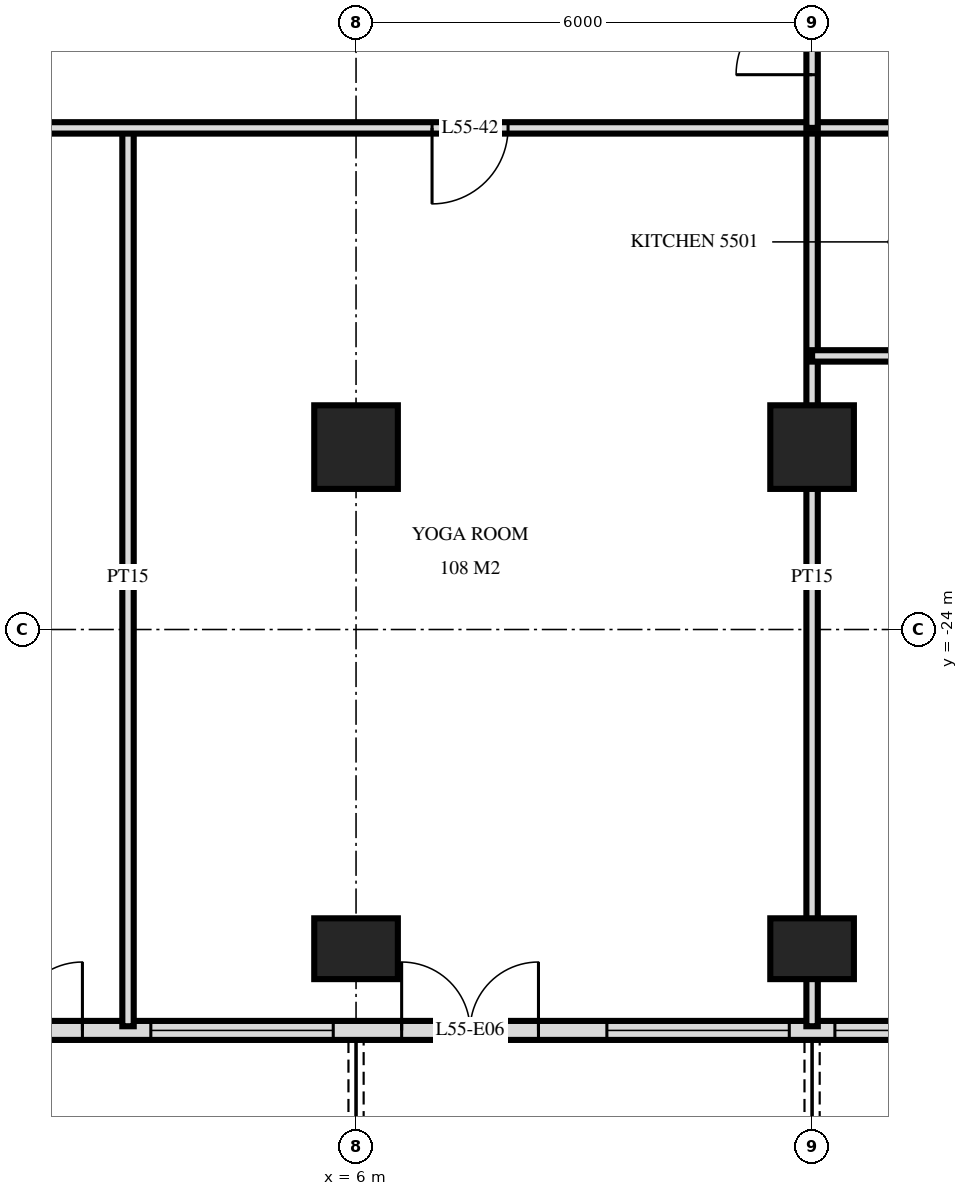
"""IFC4 building model, lengths in metres.
Left out: names, types, materials, properties, quantities, classifications, styles, units other than length and angle.
Written with IfcOpenShell. Run it as: python <this file> out.ifc"""

import sys

from ifc_helpers import new_model, si_unit, direction, frame, frame_2d, origin, origin_2d, place, context, subcontext, project, spatial, rectangle, extrude, element, fill, save


model = new_model("IFC4")
c1 = context("Model", 3, precision=1e-05, world=origin(), true_north=direction((0.0, 1.0)))
c2 = subcontext(c1, "Body", "Model", "MODEL_VIEW")
j1 = project(units=[si_unit("LENGTHUNIT", "METRE"), si_unit("PLANEANGLEUNIT", "RADIAN")], contexts=[c1])
p1 = place(None, origin())
s1 = spatial("IfcSite", under=j1, at=p1, CompositionType="ELEMENT")
p2 = place(p1, origin())
s2 = spatial("IfcBuilding", under=s1, at=p2, CompositionType="ELEMENT")
p3 = place(p2, frame((0.0, 0.0, 211.6)))
s3 = spatial("IfcBuildingStorey", under=s2, at=p3, CompositionType="ELEMENT", Elevation=211.6)
p4 = place(p3, frame((6.0, -28.2, 0.0), z_axis=(0.0, 0.0, 1.0), x_axis=(1.0, 0.0, 0.0)))
e1 = element("IfcColumn", 1, at=p4, inside=s3, PredefinedType="COLUMN", context=c2, shape_type="SweptSolid", body=[
    extrude(rectangle(XDim=1.1, YDim=0.8, at=origin_2d()), origin(), (0.0, 0.0, 1.0), 3.5),
])
p5 = place(p3, frame((6.0, -21.6, 0.0), z_axis=(0.0, 0.0, 1.0), x_axis=(1.0, 0.0, 0.0)))
e2 = element("IfcColumn", 2, at=p5, inside=s3, PredefinedType="COLUMN", context=c2, shape_type="SweptSolid", body=[
    extrude(rectangle(XDim=1.1, YDim=1.1, at=origin_2d()), origin(), (0.0, 0.0, 1.0), 3.5),
])
p6 = place(p3, frame((12.0, -28.2, 0.0), z_axis=(0.0, 0.0, 1.0), x_axis=(1.0, 0.0, 0.0)))
e3 = element("IfcColumn", 3, at=p6, inside=s3, PredefinedType="COLUMN", context=c2, shape_type="SweptSolid", body=[
    extrude(rectangle(XDim=1.1, YDim=0.8, at=origin_2d()), origin(), (0.0, 0.0, 1.0), 3.5),
])
p7 = place(p3, frame((12.0, -21.6, 0.0), z_axis=(0.0, 0.0, 1.0), x_axis=(1.0, 0.0, 0.0)))
e4 = element("IfcColumn", 4, at=p7, inside=s3, PredefinedType="COLUMN", context=c2, shape_type="SweptSolid", body=[
    extrude(rectangle(XDim=1.1, YDim=1.1, at=origin_2d()), origin(), (0.0, 0.0, 1.0), 3.5),
])
p8 = place(p3, frame((-22.475, -29.275, 0.0), z_axis=(0.0, 0.0, 1.0), x_axis=(1.0, 0.0, 0.0)))
e5 = element("IfcWall", 5, at=p8, inside=s3, PredefinedType="SOLIDWALL", context=c2, shape_type="SweptSolid", body=[
    extrude(rectangle(XDim=44.951, YDim=0.25, at=frame_2d((22.475, 0.0))), origin(), (0.0, 0.0, 1.0), 3.22),
])
p9 = place(p8, frame((0.575, 0.0, 0.0)))
e6 = element("IfcOpeningElement", 6, at=p9, cuts=e5, PredefinedType="OPENING", context=c2, shape_type="SweptSolid", body=[
    extrude(rectangle(XDim=1.8, YDim=2.4, at=frame_2d((0.9, 1.2))), frame((0.0, 0.135, 0.0), z_axis=(0.0, -1.0, 0.0), x_axis=(1.0, 0.0, 0.0)), (0.0, 0.0, 1.0), 0.27),
])
p10 = place(p8, frame((6.2, 0.0, 0.0)))
e7 = element("IfcOpeningElement", 7, at=p10, cuts=e5, PredefinedType="OPENING", context=c2, shape_type="SweptSolid", body=[
    extrude(rectangle(XDim=1.8, YDim=2.4, at=frame_2d((0.9, 1.2))), frame((0.0, 0.135, 0.0), z_axis=(0.0, -1.0, 0.0), x_axis=(1.0, 0.0, 0.0)), (0.0, 0.0, 1.0), 0.27),
])
p11 = place(p8, frame((8.45, 0.0, 0.9)))
e8 = element("IfcOpeningElement", 8, at=p11, cuts=e5, PredefinedType="OPENING", context=c2, shape_type="SweptSolid", body=[
    extrude(rectangle(XDim=1.8, YDim=1.5, at=frame_2d((0.9, 0.75))), frame((0.0, 0.135, 0.0), z_axis=(0.0, -1.0, 0.0), x_axis=(1.0, 0.0, 0.0)), (0.0, 0.0, 1.0), 0.27),
])
p12 = place(p8, frame((11.075, 0.0, 0.0)))
e9 = element("IfcOpeningElement", 9, at=p12, cuts=e5, PredefinedType="OPENING", context=c2, shape_type="SweptSolid", body=[
    extrude(rectangle(XDim=1.8, YDim=2.4, at=frame_2d((0.9, 1.2))), frame((0.0, 0.135, 0.0), z_axis=(0.0, -1.0, 0.0), x_axis=(1.0, 0.0, 0.0)), (0.0, 0.0, 1.0), 0.27),
])
p13 = place(p8, frame((13.775, 0.0, 0.9)))
e10 = element("IfcOpeningElement", 10, at=p13, cuts=e5, PredefinedType="OPENING", context=c2, shape_type="SweptSolid", body=[
    extrude(rectangle(XDim=2.4, YDim=1.5, at=frame_2d((1.2, 0.75))), frame((0.0, 0.135, 0.0), z_axis=(0.0, -1.0, 0.0), x_axis=(1.0, 0.0, 0.0)), (0.0, 0.0, 1.0), 0.27),
])
p14 = place(p8, frame((16.775, 0.0, 0.9)))
e11 = element("IfcOpeningElement", 11, at=p14, cuts=e5, PredefinedType="OPENING", context=c2, shape_type="SweptSolid", body=[
    extrude(rectangle(XDim=2.4, YDim=1.5, at=frame_2d((1.2, 0.75))), frame((0.0, 0.135, 0.0), z_axis=(0.0, -1.0, 0.0), x_axis=(1.0, 0.0, 0.0)), (0.0, 0.0, 1.0), 0.27),
])
p15 = place(p8, frame((20.075, 0.0, 0.0)))
e12 = element("IfcOpeningElement", 12, at=p15, cuts=e5, PredefinedType="OPENING", context=c2, shape_type="SweptSolid", body=[
    extrude(rectangle(XDim=1.8, YDim=2.4, at=frame_2d((0.9, 1.2))), frame((0.0, 0.135, 0.0), z_axis=(0.0, -1.0, 0.0), x_axis=(1.0, 0.0, 0.0)), (0.0, 0.0, 1.0), 0.27),
])
p16 = place(p8, frame((23.075, 0.0, 0.0)))
e13 = element("IfcOpeningElement", 13, at=p16, cuts=e5, PredefinedType="OPENING", context=c2, shape_type="SweptSolid", body=[
    extrude(rectangle(XDim=1.8, YDim=2.4, at=frame_2d((0.9, 1.2))), frame((0.0, 0.135, 0.0), z_axis=(0.0, -1.0, 0.0), x_axis=(1.0, 0.0, 0.0)), (0.0, 0.0, 1.0), 0.27),
])
p17 = place(p8, frame((25.775, 0.0, 0.9)))
e14 = element("IfcOpeningElement", 14, at=p17, cuts=e5, PredefinedType="OPENING", context=c2, shape_type="SweptSolid", body=[
    extrude(rectangle(XDim=2.4, YDim=1.5, at=frame_2d((1.2, 0.75))), frame((0.0, 0.135, 0.0), z_axis=(0.0, -1.0, 0.0), x_axis=(1.0, 0.0, 0.0)), (0.0, 0.0, 1.0), 0.27),
])
p18 = place(p8, frame((29.075, 0.0, 0.0)))
e15 = element("IfcOpeningElement", 15, at=p18, cuts=e5, PredefinedType="OPENING", context=c2, shape_type="SweptSolid", body=[
    extrude(rectangle(XDim=1.8, YDim=2.4, at=frame_2d((0.9, 1.2))), frame((0.0, 0.135, 0.0), z_axis=(0.0, -1.0, 0.0), x_axis=(1.0, 0.0, 0.0)), (0.0, 0.0, 1.0), 0.27),
])
p19 = place(p8, frame((31.775, 0.0, 0.9)))
e16 = element("IfcOpeningElement", 16, at=p19, cuts=e5, PredefinedType="OPENING", context=c2, shape_type="SweptSolid", body=[
    extrude(rectangle(XDim=2.4, YDim=1.5, at=frame_2d((1.2, 0.75))), frame((0.0, 0.135, 0.0), z_axis=(0.0, -1.0, 0.0), x_axis=(1.0, 0.0, 0.0)), (0.0, 0.0, 1.0), 0.27),
])
p20 = place(p8, frame((34.775, 0.0, 0.9)))
e17 = element("IfcOpeningElement", 17, at=p20, cuts=e5, PredefinedType="OPENING", context=c2, shape_type="SweptSolid", body=[
    extrude(rectangle(XDim=2.4, YDim=1.5, at=frame_2d((1.2, 0.75))), frame((0.0, 0.135, 0.0), z_axis=(0.0, -1.0, 0.0), x_axis=(1.0, 0.0, 0.0)), (0.0, 0.0, 1.0), 0.27),
])
p21 = place(p8, frame((38.075, 0.0, 0.0)))
e18 = element("IfcOpeningElement", 18, at=p21, cuts=e5, PredefinedType="OPENING", context=c2, shape_type="SweptSolid", body=[
    extrude(rectangle(XDim=1.8, YDim=2.4, at=frame_2d((0.9, 1.2))), frame((0.0, 0.135, 0.0), z_axis=(0.0, -1.0, 0.0), x_axis=(1.0, 0.0, 0.0)), (0.0, 0.0, 1.0), 0.27),
])
p22 = place(p8, frame((41.075, 0.0, 0.0)))
e19 = element("IfcOpeningElement", 19, at=p22, cuts=e5, PredefinedType="OPENING", context=c2, shape_type="SweptSolid", body=[
    extrude(rectangle(XDim=1.8, YDim=2.4, at=frame_2d((0.9, 1.2))), frame((0.0, 0.135, 0.0), z_axis=(0.0, -1.0, 0.0), x_axis=(1.0, 0.0, 0.0)), (0.0, 0.0, 1.0), 0.27),
])
p23 = place(p3, frame((12.0, -17.4, 0.0), z_axis=(0.0, 0.0, 1.0), x_axis=(0.0, 1.0, 0.0)))
e20 = element("IfcWall", 20, at=p23, inside=s3, PredefinedType="PARTITIONING", context=c2, shape_type="SweptSolid", body=[
    extrude(rectangle(XDim=2.35, YDim=0.15, at=frame_2d((1.175, 0.0))), origin(), (0.0, 0.0, 1.0), 3.22),
])
p24 = place(p23, frame((0.7, 0.0, 0.0)))
e21 = element("IfcOpeningElement", 21, at=p24, cuts=e20, PredefinedType="OPENING", context=c2, shape_type="SweptSolid", body=[
    extrude(rectangle(XDim=1.0, YDim=2.1, at=frame_2d((0.5, 1.05))), frame((0.0, 0.085, 0.0), z_axis=(0.0, -1.0, 0.0), x_axis=(1.0, 0.0, 0.0)), (0.0, 0.0, 1.0), 0.17),
])
for number, where, z_axis, x_axis in (
    (22, (12.0, -29.22, 0.0), (0.0, 0.0, 1.0), (0.0, 1.0, 0.0)),
    (23, (3.0, -29.22, 0.0), (0.0, 0.0, 1.0), (0.0, 1.0, 0.0)),
):
    element("IfcWall", number, at=place(p3, frame(where, z_axis=z_axis, x_axis=x_axis)), inside=s3, PredefinedType="PARTITIONING", context=c2, shape_type="SweptSolid", body=[
        extrude(rectangle(XDim=11.82, YDim=0.15, at=frame_2d((5.91, 0.0))), origin(), (0.0, 0.0, 1.0), 3.22),
    ])
p25 = place(p3, frame((12.0, -20.4, 0.0), z_axis=(0.0, 0.0, 1.0), x_axis=(1.0, 0.0, 0.0)))
e24 = element("IfcWall", 24, at=p25, inside=s3, PredefinedType="PARTITIONING", context=c2, shape_type="SweptSolid", body=[
    extrude(rectangle(XDim=2.1, YDim=0.15, at=frame_2d((1.05, 0.0))), origin(), (0.0, 0.0, 1.0), 3.22),
])
p26 = place(p3, frame((-26.82, -17.4, 0.0), z_axis=(0.0, 0.0, 1.0), x_axis=(1.0, 0.0, 0.0)))
e25 = element("IfcWall", 25, at=p26, inside=s3, PredefinedType="PARTITIONING", context=c2, shape_type="SweptSolid", body=[
    extrude(rectangle(XDim=53.64, YDim=0.15, at=frame_2d((26.82, 0.0))), origin(), (0.0, 0.0, 1.0), 3.22),
])
p27 = place(p26, frame((4.92, 0.0, 0.0)))
e26 = element("IfcOpeningElement", 26, at=p27, cuts=e25, PredefinedType="OPENING", context=c2, shape_type="SweptSolid", body=[
    extrude(rectangle(XDim=1.0, YDim=2.1, at=frame_2d((0.5, 1.05))), frame((0.0, 0.085, 0.0), z_axis=(0.0, -1.0, 0.0), x_axis=(1.0, 0.0, 0.0)), (0.0, 0.0, 1.0), 0.17),
])
p28 = place(p26, frame((1.62, 0.0, 0.0)))
e27 = element("IfcOpeningElement", 27, at=p28, cuts=e25, PredefinedType="OPENING", context=c2, shape_type="SweptSolid", body=[
    extrude(rectangle(XDim=1.0, YDim=2.1, at=frame_2d((0.5, 1.05))), frame((0.0, 0.085, 0.0), z_axis=(0.0, -1.0, 0.0), x_axis=(1.0, 0.0, 0.0)), (0.0, 0.0, 1.0), 0.17),
])
p29 = place(p26, frame((41.17, 0.0, 0.0)))
e28 = element("IfcOpeningElement", 28, at=p29, cuts=e25, PredefinedType="OPENING", context=c2, shape_type="SweptSolid", body=[
    extrude(rectangle(XDim=1.0, YDim=2.1, at=frame_2d((0.5, 1.05))), frame((0.0, 0.085, 0.0), z_axis=(0.0, -1.0, 0.0), x_axis=(1.0, 0.0, 0.0)), (0.0, 0.0, 1.0), 0.17),
])
p30 = place(p26, frame((49.42, 0.0, 0.0)))
e29 = element("IfcOpeningElement", 29, at=p30, cuts=e25, PredefinedType="OPENING", context=c2, shape_type="SweptSolid", body=[
    extrude(rectangle(XDim=1.0, YDim=2.1, at=frame_2d((0.5, 1.05))), frame((0.0, 0.085, 0.0), z_axis=(0.0, -1.0, 0.0), x_axis=(1.0, 0.0, 0.0)), (0.0, 0.0, 1.0), 0.17),
])
p31 = place(p26, frame((47.62, 0.0, 0.0)))
e30 = element("IfcOpeningElement", 30, at=p31, cuts=e25, PredefinedType="OPENING", context=c2, shape_type="SweptSolid", body=[
    extrude(rectangle(XDim=1.0, YDim=2.1, at=frame_2d((0.5, 1.05))), frame((0.0, 0.085, 0.0), z_axis=(0.0, -1.0, 0.0), x_axis=(1.0, 0.0, 0.0)), (0.0, 0.0, 1.0), 0.17),
])
p32 = place(p26, frame((21.82, 0.0, 0.0)))
e31 = element("IfcOpeningElement", 31, at=p32, cuts=e25, PredefinedType="OPENING", context=c2, shape_type="SweptSolid", body=[
    extrude(rectangle(XDim=1.0, YDim=2.1, at=frame_2d((0.5, 1.05))), frame((0.0, 0.085, 0.0), z_axis=(0.0, -1.0, 0.0), x_axis=(1.0, 0.0, 0.0)), (0.0, 0.0, 1.0), 0.17),
])
p33 = place(p26, frame((33.82, 0.0, 0.0)))
e32 = element("IfcOpeningElement", 32, at=p33, cuts=e25, PredefinedType="OPENING", context=c2, shape_type="SweptSolid", body=[
    extrude(rectangle(XDim=1.0, YDim=2.1, at=frame_2d((0.5, 1.05))), frame((0.0, 0.085, 0.0), z_axis=(0.0, -1.0, 0.0), x_axis=(1.0, 0.0, 0.0)), (0.0, 0.0, 1.0), 0.17),
])
p34 = place(p16, origin())
e33 = element("IfcDoor", 33, at=p34, inside=s3, OperationType="DOUBLE_DOOR_SINGLE_SWING", PredefinedType="DOOR", context=c2, shape_type="SweptSolid", body=[
    extrude(rectangle(XDim=1.8, YDim=2.4, at=frame_2d((0.9, 1.2))), frame((0.0, 0.025, 0.0), z_axis=(0.0, -1.0, 0.0), x_axis=(1.0, 0.0, 0.0)), (0.0, 0.0, 1.0), 0.05),
])
fill(e13, e33)
p35 = place(p17, origin())
e34 = element("IfcWindow", 34, at=p35, inside=s3, PartitioningType="SINGLE_PANEL", PredefinedType="WINDOW", context=c2, shape_type="SweptSolid", body=[
    extrude(rectangle(XDim=2.4, YDim=1.5, at=frame_2d((1.2, 0.75))), frame((0.0, 0.03, 0.0), z_axis=(0.0, -1.0, 0.0), x_axis=(1.0, 0.0, 0.0)), (0.0, 0.0, 1.0), 0.06),
])
fill(e14, e34)
p36 = place(p18, origin())
e35 = element("IfcDoor", 35, at=p36, inside=s3, OperationType="DOUBLE_DOOR_SINGLE_SWING", PredefinedType="DOOR", context=c2, shape_type="SweptSolid", body=[
    extrude(rectangle(XDim=1.8, YDim=2.4, at=frame_2d((0.9, 1.2))), frame((0.0, 0.025, 0.0), z_axis=(0.0, -1.0, 0.0), x_axis=(1.0, 0.0, 0.0)), (0.0, 0.0, 1.0), 0.05),
])
fill(e15, e35)
p37 = place(p19, origin())
e36 = element("IfcWindow", 36, at=p37, inside=s3, PartitioningType="SINGLE_PANEL", PredefinedType="WINDOW", context=c2, shape_type="SweptSolid", body=[
    extrude(rectangle(XDim=2.4, YDim=1.5, at=frame_2d((1.2, 0.75))), frame((0.0, 0.03, 0.0), z_axis=(0.0, -1.0, 0.0), x_axis=(1.0, 0.0, 0.0)), (0.0, 0.0, 1.0), 0.06),
])
fill(e16, e36)
p38 = place(p20, origin())
e37 = element("IfcWindow", 37, at=p38, inside=s3, PartitioningType="SINGLE_PANEL", PredefinedType="WINDOW", context=c2, shape_type="SweptSolid", body=[
    extrude(rectangle(XDim=2.4, YDim=1.5, at=frame_2d((1.2, 0.75))), frame((0.0, 0.03, 0.0), z_axis=(0.0, -1.0, 0.0), x_axis=(1.0, 0.0, 0.0)), (0.0, 0.0, 1.0), 0.06),
])
fill(e17, e37)
p39 = place(p24, origin())
e38 = element("IfcDoor", 38, at=p39, inside=s3, OperationType="SINGLE_SWING_RIGHT", PredefinedType="DOOR", context=c2, shape_type="SweptSolid", body=[
    extrude(rectangle(XDim=1.0, YDim=2.1, at=frame_2d((0.5, 1.05))), frame((0.0, 0.025, 0.0), z_axis=(0.0, -1.0, 0.0), x_axis=(1.0, 0.0, 0.0)), (0.0, 0.0, 1.0), 0.05),
])
fill(e21, e38)
p40 = place(p33, frame((0.5, 0.0, 0.0), z_axis=(0.0, 0.0, 1.0), x_axis=(-1.0, 0.0, 0.0)))
e39 = element("IfcDoor", 39, at=p40, inside=s3, OperationType="SINGLE_SWING_LEFT", PredefinedType="DOOR", context=c2, shape_type="SweptSolid", body=[
    extrude(rectangle(XDim=1.0, YDim=2.1, at=frame_2d((0.0, 1.05))), frame((0.0, -0.025, 0.0), z_axis=(0.0, 1.0, 0.0), x_axis=(-1.0, 0.0, 0.0)), (0.0, 0.0, 1.0), 0.05),
])
fill(e32, e39)
save(model, sys.argv[1])
